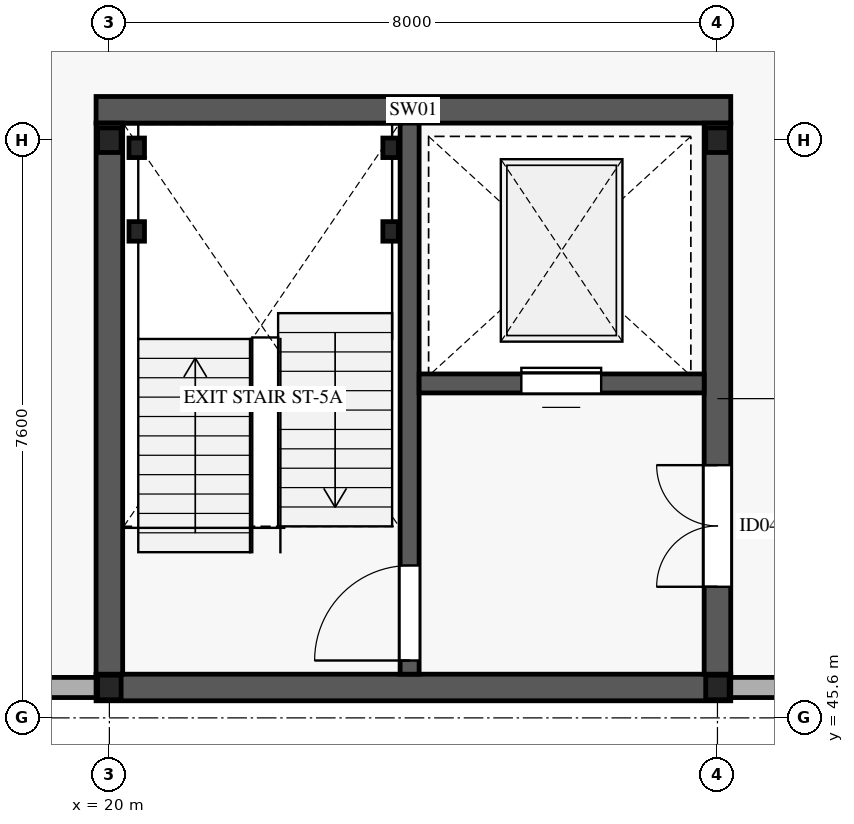
"""IFC4 building model, lengths in metres.
Left out: names, types, materials, properties, quantities, classifications, styles, units other than length and angle.
Written with IfcOpenShell. Run it as: python <this file> out.ifc"""

import sys

from ifc_helpers import new_model, si_unit, direction, frame, frame_2d, origin, origin_2d, place, context, subcontext, project, spatial, rectangle, i_section, extrude, element, fill, save


model = new_model("IFC4")
c1 = context("Model", 3, precision=1e-05, world=origin(), true_north=direction((0.0, 1.0)))
c2 = subcontext(c1, "Body", "Model", "MODEL_VIEW")
j1 = project(units=[si_unit("LENGTHUNIT", "METRE"), si_unit("PLANEANGLEUNIT", "RADIAN")], contexts=[c1])
p1 = place(None, origin())
s1 = spatial("IfcSite", under=j1, at=p1, CompositionType="ELEMENT")
p2 = place(p1, origin())
s2 = spatial("IfcBuilding", under=s1, at=p2, CompositionType="ELEMENT")
p3 = place(p2, frame((0.0, 0.0, 25.2)))
s3 = spatial("IfcBuildingStorey", under=s2, at=p3, CompositionType="ELEMENT", Elevation=25.2)
for number, where, z_axis, x_axis in (
    (1, (20.0, 46.0, 0.0), (0.0, 0.0, 1.0), (1.0, 0.0, 0.0)),
    (2, (20.0, 53.2, 0.0), (0.0, 0.0, 1.0), (1.0, 0.0, 0.0)),
    (3, (28.0, 46.0, 0.0), (0.0, 0.0, 1.0), (1.0, 0.0, 0.0)),
    (4, (28.0, 53.2, 0.0), (0.0, 0.0, 1.0), (1.0, 0.0, 0.0)),
):
    element("IfcColumn", number, at=place(p3, frame(where, z_axis=z_axis, x_axis=x_axis)), inside=s3, PredefinedType="COLUMN", context=c2, shape_type="SweptSolid", body=[
        extrude(i_section(OverallWidth=0.309, OverallDepth=0.323, WebThickness=0.014, FlangeThickness=0.023, FilletRadius=0.015, at=origin_2d()), origin(), (0.0, 0.0, 1.0), 3.995),
    ])
p4 = place(p3, frame((36.02, 46.0, 0.0), z_axis=(0.0, 0.0, 1.0), x_axis=(-1.0, 0.0, 0.0)))
e5 = element("IfcWall", 5, at=p4, inside=s3, PredefinedType="STANDARD", context=c2, shape_type="SweptSolid", body=[
    extrude(rectangle(XDim=8.04, YDim=0.265, at=frame_2d((4.02, 0.0))), origin(), (0.0, 0.0, 1.0), 3.06),
])
p5 = place(p4, frame((3.22, 0.0, 0.75)))
e6 = element("IfcOpeningElement", 6, at=p5, cuts=e5, PredefinedType="OPENING", context=c2, shape_type="SweptSolid", body=[
    extrude(rectangle(XDim=1.6, YDim=2.0, at=frame_2d((0.8, 1.0))), frame((0.0, 0.142, 0.0), z_axis=(0.0, -1.0, 0.0), x_axis=(1.0, 0.0, 0.0)), (0.0, 0.0, 1.0), 0.285),
])
p6 = place(p3, frame((20.02, 46.0, 0.0), z_axis=(0.0, 0.0, 1.0), x_axis=(-1.0, 0.0, 0.0)))
e7 = element("IfcWall", 7, at=p6, inside=s3, PredefinedType="STANDARD", context=c2, shape_type="SweptSolid", body=[
    extrude(rectangle(XDim=8.04, YDim=0.265, at=frame_2d((4.02, 0.0))), origin(), (0.0, 0.0, 1.0), 3.06),
])
p7 = place(p6, frame((3.12, 0.0, 0.75)))
e8 = element("IfcOpeningElement", 8, at=p7, cuts=e7, PredefinedType="OPENING", context=c2, shape_type="SweptSolid", body=[
    extrude(rectangle(XDim=1.8, YDim=2.0, at=frame_2d((0.9, 1.0))), frame((0.0, 0.142, 0.0), z_axis=(0.0, -1.0, 0.0), x_axis=(1.0, 0.0, 0.0)), (0.0, 0.0, 1.0), 0.285),
])
for number, where, z_axis, x_axis in (
    (9, (19.825, 46.0, 0.0), (0.0, 0.0, 1.0), (1.0, 0.0, 0.0)),
    (10, (19.825, 53.6, 0.0), (0.0, 0.0, 1.0), (1.0, 0.0, 0.0)),
):
    element("IfcWall", number, at=place(p3, frame(where, z_axis=z_axis, x_axis=x_axis)), inside=s3, PredefinedType="SHEAR", context=c2, shape_type="SweptSolid", body=[
        extrude(rectangle(XDim=8.35, YDim=0.35, at=frame_2d((4.175, 0.0))), origin(), (0.0, 0.0, 1.0), 3.99),
    ])
p8 = place(p3, frame((20.0, 46.175, 0.0), z_axis=(0.0, 0.0, 1.0), x_axis=(0.0, 1.0, 0.0)))
e11 = element("IfcWall", 11, at=p8, inside=s3, PredefinedType="SHEAR", context=c2, shape_type="SweptSolid", body=[
    extrude(rectangle(XDim=7.25, YDim=0.35, at=frame_2d((3.625, 0.0))), origin(), (0.0, 0.0, 1.0), 3.99),
])
p9 = place(p3, frame((28.0, 46.175, 0.0), z_axis=(0.0, 0.0, 1.0), x_axis=(0.0, 1.0, 0.0)))
e12 = element("IfcWall", 12, at=p9, inside=s3, PredefinedType="SHEAR", context=c2, shape_type="SweptSolid", body=[
    extrude(rectangle(XDim=7.25, YDim=0.35, at=frame_2d((3.625, 0.0))), origin(), (0.0, 0.0, 1.0), 3.99),
])
p10 = place(p9, frame((1.15, 0.0, 0.0)))
e13 = element("IfcOpeningElement", 13, at=p10, cuts=e12, PredefinedType="OPENING", context=c2, shape_type="SweptSolid", body=[
    extrude(rectangle(XDim=1.6, YDim=2.35, at=frame_2d((0.8, 1.175))), frame((0.0, 0.185, 0.0), z_axis=(0.0, -1.0, 0.0), x_axis=(1.0, 0.0, 0.0)), (0.0, 0.0, 1.0), 0.37),
])
p11 = place(p3, frame((23.95, 46.175, 0.0), z_axis=(0.0, 0.0, 1.0), x_axis=(0.0, 1.0, 0.0)))
e14 = element("IfcWall", 14, at=p11, inside=s3, PredefinedType="SHEAR", context=c2, shape_type="SweptSolid", body=[
    extrude(rectangle(XDim=7.25, YDim=0.25, at=frame_2d((3.625, 0.0))), origin(), (0.0, 0.0, 1.0), 3.99),
])
p12 = place(p11, frame((0.18, 0.0, 0.0)))
e15 = element("IfcOpeningElement", 15, at=p12, cuts=e14, PredefinedType="OPENING", context=c2, shape_type="SweptSolid", body=[
    extrude(rectangle(XDim=1.25, YDim=2.2, at=frame_2d((0.625, 1.1))), frame((0.0, 0.135, 0.0), z_axis=(0.0, -1.0, 0.0), x_axis=(1.0, 0.0, 0.0)), (0.0, 0.0, 1.0), 0.27),
])
p13 = place(p3, frame((24.075, 50.0, 0.0), z_axis=(0.0, 0.0, 1.0), x_axis=(1.0, 0.0, 0.0)))
e16 = element("IfcWall", 16, at=p13, inside=s3, PredefinedType="SHEAR", context=c2, shape_type="SweptSolid", body=[
    extrude(rectangle(XDim=3.75, YDim=0.25, at=frame_2d((1.875, 0.0))), origin(), (0.0, 0.0, 1.0), 3.99),
])
p14 = place(p13, frame((1.345, 0.0, 0.0)))
e17 = element("IfcOpeningElement", 17, at=p14, cuts=e16, PredefinedType="OPENING", context=c2, shape_type="SweptSolid", body=[
    extrude(rectangle(XDim=1.05, YDim=2.2, at=frame_2d((0.525, 1.1))), frame((0.0, 0.135, 0.0), z_axis=(0.0, -1.0, 0.0), x_axis=(1.0, 0.0, 0.0)), (0.0, 0.0, 1.0), 0.27),
])
for number, where, z_axis, x_axis in (
    (18, (20.36, 52.0, 0.0), (0.0, 0.0, 1.0), (1.0, 0.0, 0.0)),
    (19, (23.7, 52.0, 0.0), (0.0, 0.0, 1.0), (1.0, 0.0, 0.0)),
    (20, (20.36, 53.1, 0.0), (0.0, 0.0, 1.0), (1.0, 0.0, 0.0)),
    (21, (23.7, 53.1, 0.0), (0.0, 0.0, 1.0), (1.0, 0.0, 0.0)),
):
    element("IfcColumn", number, at=place(p3, frame(where, z_axis=z_axis, x_axis=x_axis)), inside=s3, PredefinedType="COLUMN", context=c2, shape_type="SweptSolid", body=[
        extrude(i_section(OverallWidth=0.204, OverallDepth=0.257, WebThickness=0.009, FlangeThickness=0.016, FilletRadius=0.013, at=origin_2d()), origin(), (0.0, 0.0, 1.0), 4.195),
    ])
p15 = place(p12, origin())
e22 = element("IfcDoor", 22, at=p15, inside=s3, OperationType="SINGLE_SWING_LEFT", PredefinedType="DOOR", context=c2, shape_type="SweptSolid", body=[
    extrude(rectangle(XDim=1.25, YDim=2.2, at=frame_2d((0.625, 1.1))), frame((0.0, 0.025, 0.0), z_axis=(0.0, -1.0, 0.0), x_axis=(1.0, 0.0, 0.0)), (0.0, 0.0, 1.0), 0.05),
])
fill(e15, e22)
p16 = place(p10, origin())
e23 = element("IfcDoor", 23, at=p16, inside=s3, OperationType="DOUBLE_DOOR_SINGLE_SWING", PredefinedType="DOOR", context=c2, shape_type="SweptSolid", body=[
    extrude(rectangle(XDim=1.6, YDim=2.35, at=frame_2d((0.8, 1.175))), frame((0.0, 0.025, 0.0), z_axis=(0.0, -1.0, 0.0), x_axis=(1.0, 0.0, 0.0)), (0.0, 0.0, 1.0), 0.05),
])
fill(e13, e23)
p17 = place(p14, origin())
e24 = element("IfcDoor", 24, at=p17, inside=s3, OperationType="SLIDING_TO_RIGHT", PredefinedType="DOOR", context=c2, shape_type="SweptSolid", body=[
    extrude(rectangle(XDim=1.05, YDim=2.2, at=frame_2d((0.525, 1.1))), frame((0.0, 0.025, 0.0), z_axis=(0.0, -1.0, 0.0), x_axis=(1.0, 0.0, 0.0)), (0.0, 0.0, 1.0), 0.05),
])
fill(e17, e24)
save(model, sys.argv[1])
